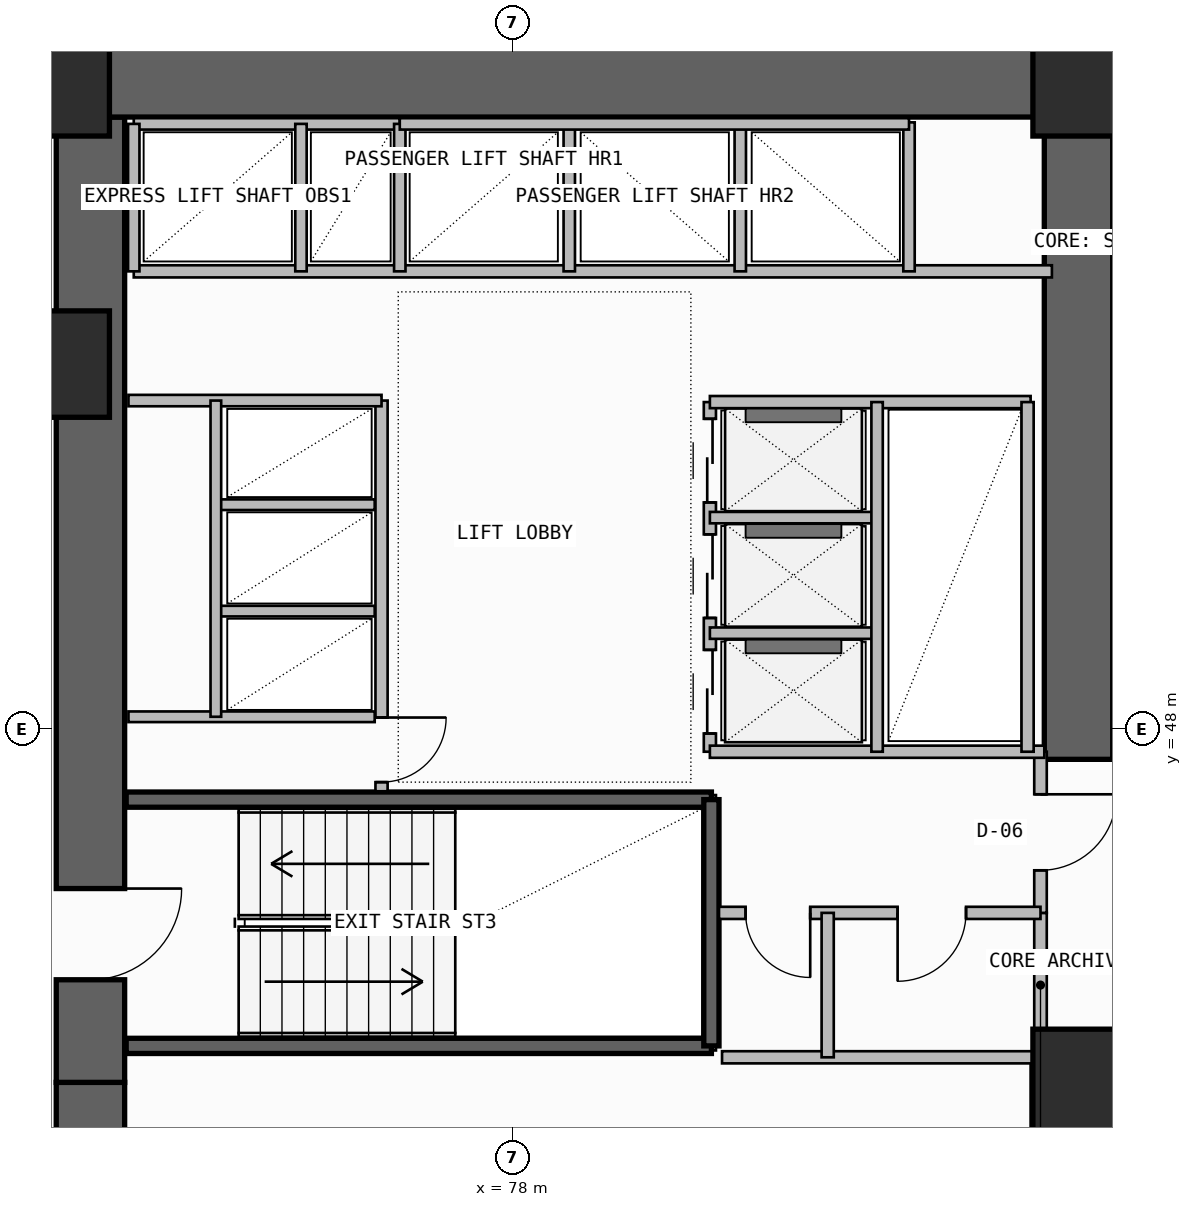
"""IFC4 building model, lengths in metres.
Left out: names, types, materials, properties, quantities, classifications, styles, units other than length and angle.
Written with IfcOpenShell. Run it as: python <this file> out.ifc"""

import sys

from ifc_helpers import new_model, si_unit, direction, frame, frame_2d, origin, origin_2d, place, context, subcontext, project, spatial, rectangle, extrude, element, fill, save


model = new_model("IFC4")
c1 = context("Model", 3, precision=1e-05, world=origin(), true_north=direction((0.0, 1.0)))
c2 = subcontext(c1, "Body", "Model", "MODEL_VIEW")
j1 = project(units=[si_unit("LENGTHUNIT", "METRE"), si_unit("PLANEANGLEUNIT", "RADIAN")], contexts=[c1])
p1 = place(None, origin())
s1 = spatial("IfcSite", under=j1, at=p1, CompositionType="ELEMENT")
p2 = place(p1, origin())
s2 = spatial("IfcBuilding", under=s1, at=p2, CompositionType="ELEMENT")
p3 = place(p2, frame((0.0, 0.0, 95.7)))
s3 = spatial("IfcBuildingStorey", under=s2, at=p3, CompositionType="ELEMENT", Elevation=95.7)
p4 = place(p3, frame((72.45, 35.5, -0.4), z_axis=(0.0, 0.0, 1.0), x_axis=(0.0, 1.0, 0.0)))
e1 = element("IfcWall", 1, at=p4, inside=s3, PredefinedType="SHEAR", context=c2, shape_type="SweptSolid", body=[
    extrude(rectangle(XDim=7.85, YDim=0.9, at=frame_2d((3.925, 0.0))), origin(), (0.0, 0.0, 1.0), 3.74),
])
p5 = place(p4, frame((1.45, 0.0, 0.4)))
e2 = element("IfcOpeningElement", 2, at=p5, cuts=e1, PredefinedType="OPENING", context=c2, shape_type="SweptSolid", body=[
    extrude(rectangle(XDim=1.2, YDim=2.2, at=frame_2d((0.6, 1.1))), frame((0.0, 0.46, 0.0), z_axis=(0.0, -1.0, 0.0), x_axis=(1.0, 0.0, 0.0)), (0.0, 0.0, 1.0), 0.92),
])
p6 = place(p3, frame((72.45, 43.35, -0.4), z_axis=(0.0, 0.0, 1.0), x_axis=(0.0, 1.0, 0.0)))
e3 = element("IfcWall", 3, at=p6, inside=s3, PredefinedType="SHEAR", context=c2, shape_type="SweptSolid", body=[
    extrude(rectangle(XDim=12.7, YDim=0.9, at=frame_2d((6.35, 0.0))), origin(), (0.0, 0.0, 1.0), 3.74),
])
p7 = place(p6, frame((1.35, 0.0, 0.4)))
e4 = element("IfcOpeningElement", 4, at=p7, cuts=e3, PredefinedType="OPENING", context=c2, shape_type="SweptSolid", body=[
    extrude(rectangle(XDim=1.2, YDim=2.2, at=frame_2d((0.6, 1.1))), frame((0.0, 0.46, 0.0), z_axis=(0.0, -1.0, 0.0), x_axis=(1.0, 0.0, 0.0)), (0.0, 0.0, 1.0), 0.92),
])
p8 = place(p3, frame((72.0, 56.5, -0.4), z_axis=(0.0, 0.0, 1.0), x_axis=(1.0, 0.0, 0.0)))
e5 = element("IfcWall", 5, at=p8, inside=s3, PredefinedType="SHEAR", context=c2, shape_type="SweptSolid", body=[
    extrude(rectangle(XDim=13.9, YDim=0.9, at=frame_2d((6.95, 0.0))), origin(), (0.0, 0.0, 1.0), 3.74),
])
p9 = place(p3, frame((85.45, 47.6, -0.4), z_axis=(0.0, 0.0, 1.0), x_axis=(0.0, 1.0, 0.0)))
e6 = element("IfcWall", 6, at=p9, inside=s3, PredefinedType="SHEAR", context=c2, shape_type="SweptSolid", body=[
    extrude(rectangle(XDim=8.45, YDim=0.9, at=frame_2d((4.225, 0.0))), origin(), (0.0, 0.0, 1.0), 3.74),
])
for number, where, z_axis, x_axis in (
    (7, (85.55, 43.35, 0.0), (0.0, 0.0, 1.0), (1.0, 0.0, 0.0)),
    (8, (72.0, 52.8, 0.0), (0.0, 0.0, 1.0), (1.0, 0.0, 0.0)),
    (9, (72.0, 56.5, 0.0), (0.0, 0.0, 1.0), (1.0, 0.0, 0.0)),
    (10, (85.55, 56.5, 0.0), (0.0, 0.0, 1.0), (1.0, 0.0, 0.0)),
):
    element("IfcColumn", number, at=place(p3, frame(where, z_axis=z_axis, x_axis=x_axis)), inside=s3, PredefinedType="COLUMN", context=c2, shape_type="SweptSolid", body=[
        extrude(rectangle(XDim=1.4, YDim=1.4, at=origin_2d()), origin(), (0.0, 0.0, 1.0), 3.6),
    ])
p10 = place(p3, frame((84.92, 38.85, 0.0), z_axis=(0.0, 0.0, 1.0), x_axis=(0.0, 1.0, 0.0)))
e11 = element("IfcWall", 11, at=p10, inside=s3, PredefinedType="SOLIDWALL", context=c2, shape_type="SweptSolid", body=[
    extrude(rectangle(XDim=4.83, YDim=0.2, at=frame_2d((2.415, 0.0))), origin(), (0.0, 0.0, 1.0), 3.34),
])
p11 = place(p10, frame((1.25, 0.0, 0.0)))
e12 = element("IfcOpeningElement", 12, at=p11, cuts=e11, PredefinedType="OPENING", context=c2, shape_type="SweptSolid", body=[
    extrude(rectangle(XDim=1.1, YDim=2.2, at=frame_2d((0.55, 1.1))), frame((0.0, 0.11, 0.0), z_axis=(0.0, -1.0, 0.0), x_axis=(1.0, 0.0, 0.0)), (0.0, 0.0, 1.0), 0.22),
])
for number, where, z_axis, x_axis in (
    (13, (72.92, 43.83, -0.4), (0.0, 0.0, 1.0), (1.0, 0.0, 0.0)),
    (14, (72.92, 47.07, -0.4), (0.0, 0.0, 1.0), (1.0, 0.0, 0.0)),
):
    element("IfcWall", number, at=place(p3, frame(where, z_axis=z_axis, x_axis=x_axis)), inside=s3, PredefinedType="SOLIDWALL", context=c2, shape_type="SweptSolid", body=[
        extrude(rectangle(XDim=7.7, YDim=0.2, at=frame_2d((3.85, 0.0))), origin(), (0.0, 0.0, 1.0), 3.74),
    ])
p12 = place(p3, frame((80.62, 43.83, -0.4), z_axis=(0.0, 0.0, 1.0), x_axis=(0.0, 1.0, 0.0)))
e15 = element("IfcWall", 15, at=p12, inside=s3, PredefinedType="SOLIDWALL", context=c2, shape_type="SweptSolid", body=[
    extrude(rectangle(XDim=3.24, YDim=0.2, at=frame_2d((1.62, 0.0))), origin(), (0.0, 0.0, 1.0), 3.74),
])
p13 = place(p3, frame((84.95, 43.68, 0.0), z_axis=(0.0, 0.0, 1.0), x_axis=(0.0, 1.0, 0.0)))
e16 = element("IfcWall", 16, at=p13, inside=s3, PredefinedType="PLUMBINGWALL", context=c2, shape_type="SweptSolid", body=[
    extrude(rectangle(XDim=1.9, YDim=0.165, at=frame_2d((0.95, 0.0))), origin(), (0.0, 0.0, 1.0), 3.34),
])
p14 = place(p3, frame((84.95, 45.58, 0.0), z_axis=(0.0, 0.0, 1.0), x_axis=(0.0, 1.0, 0.0)))
e17 = element("IfcWall", 17, at=p14, inside=s3, PredefinedType="PARTITIONING", context=c2, shape_type="SweptSolid", body=[
    extrude(rectangle(XDim=2.12, YDim=0.165, at=frame_2d((1.06, 0.0))), origin(), (0.0, 0.0, 1.0), 3.34),
])
p15 = place(p14, frame((0.56, 0.0, 0.0)))
e18 = element("IfcOpeningElement", 18, at=p15, cuts=e17, PredefinedType="OPENING", context=c2, shape_type="SweptSolid", body=[
    extrude(rectangle(XDim=1.0, YDim=2.2, at=frame_2d((0.5, 1.1))), frame((0.0, 0.093, 0.0), z_axis=(0.0, -1.0, 0.0), x_axis=(1.0, 0.0, 0.0)), (0.0, 0.0, 1.0), 0.185),
])
p16 = place(p3, frame((80.72, 45.58, 0.0), z_axis=(0.0, 0.0, 1.0), x_axis=(1.0, 0.0, 0.0)))
e19 = element("IfcWall", 19, at=p16, inside=s3, PredefinedType="PLUMBINGWALL", context=c2, shape_type="SweptSolid", body=[
    extrude(rectangle(XDim=4.23, YDim=0.16, at=frame_2d((2.115, 0.0))), origin(), (0.0, 0.0, 1.0), 3.34),
])
p17 = place(p16, frame((0.35, 0.0, 0.0)))
e20 = element("IfcOpeningElement", 20, at=p17, cuts=e19, PredefinedType="OPENING", context=c2, shape_type="SweptSolid", body=[
    extrude(rectangle(XDim=0.85, YDim=2.05, at=frame_2d((0.425, 1.025))), frame((0.0, 0.09, 0.0), z_axis=(0.0, -1.0, 0.0), x_axis=(1.0, 0.0, 0.0)), (0.0, 0.0, 1.0), 0.18),
])
p18 = place(p16, frame((2.35, 0.0, 0.0)))
e21 = element("IfcOpeningElement", 21, at=p18, cuts=e19, PredefinedType="OPENING", context=c2, shape_type="SweptSolid", body=[
    extrude(rectangle(XDim=0.9, YDim=2.1, at=frame_2d((0.45, 1.05))), frame((0.0, 0.09, 0.0), z_axis=(0.0, -1.0, 0.0), x_axis=(1.0, 0.0, 0.0)), (0.0, 0.0, 1.0), 0.18),
])
p19 = place(p3, frame((80.76, 43.68, 0.0), z_axis=(0.0, 0.0, 1.0), x_axis=(1.0, 0.0, 0.0)))
e22 = element("IfcWall", 22, at=p19, inside=s3, PredefinedType="PLUMBINGWALL", context=c2, shape_type="SweptSolid", body=[
    extrude(rectangle(XDim=4.19, YDim=0.16, at=frame_2d((2.095, 0.0))), origin(), (0.0, 0.0, 1.0), 3.34),
])
p20 = place(p3, frame((82.15, 43.68, 0.0), z_axis=(0.0, 0.0, 1.0), x_axis=(0.0, 1.0, 0.0)))
e23 = element("IfcWall", 23, at=p20, inside=s3, PredefinedType="PLUMBINGWALL", context=c2, shape_type="SweptSolid", body=[
    extrude(rectangle(XDim=1.9, YDim=0.16, at=frame_2d((0.95, 0.0))), origin(), (0.0, 0.0, 1.0), 3.34),
])
p21 = place(p3, frame((76.28, 47.18, 0.0), z_axis=(0.0, 0.0, 1.0), x_axis=(0.0, 1.0, 0.0)))
e24 = element("IfcWall", 24, at=p21, inside=s3, PredefinedType="SOLIDWALL", context=c2, shape_type="SweptSolid", body=[
    extrude(rectangle(XDim=5.14, YDim=0.16, at=frame_2d((2.57, 0.0))), origin(), (0.0, 0.0, 1.0), 3.34),
])
p22 = place(p21, frame((0.12, 0.0, 0.0)))
e25 = element("IfcOpeningElement", 25, at=p22, cuts=e24, PredefinedType="OPENING", context=c2, shape_type="SweptSolid", body=[
    extrude(rectangle(XDim=0.85, YDim=2.05, at=frame_2d((0.425, 1.025))), frame((0.0, 0.09, 0.0), z_axis=(0.0, -1.0, 0.0), x_axis=(1.0, 0.0, 0.0)), (0.0, 0.0, 1.0), 0.18),
])
p23 = place(p3, frame((72.95, 52.32, 0.0), z_axis=(0.0, 0.0, 1.0), x_axis=(1.0, 0.0, 0.0)))
e26 = element("IfcWall", 26, at=p23, inside=s3, PredefinedType="SOLIDWALL", context=c2, shape_type="SweptSolid", body=[
    extrude(rectangle(XDim=3.33, YDim=0.15, at=frame_2d((1.665, 0.0))), origin(), (0.0, 0.0, 1.0), 3.34),
])
p24 = place(p3, frame((72.95, 48.16, 0.0), z_axis=(0.0, 0.0, 1.0), x_axis=(1.0, 0.0, 0.0)))
e27 = element("IfcWall", 27, at=p24, inside=s3, PredefinedType="PLUMBINGWALL", context=c2, shape_type="SweptSolid", body=[
    extrude(rectangle(XDim=3.24, YDim=0.14, at=frame_2d((1.62, 0.0))), origin(), (0.0, 0.0, 1.0), 3.34),
])
for number, where, z_axis, x_axis in (
    (28, (74.15, 49.55, 0.0), (0.0, 0.0, 1.0), (1.0, 0.0, 0.0)),
    (29, (74.15, 50.95, 0.0), (0.0, 0.0, 1.0), (1.0, 0.0, 0.0)),
):
    element("IfcWall", number, at=place(p3, frame(where, z_axis=z_axis, x_axis=x_axis)), inside=s3, PredefinedType="PLUMBINGWALL", context=c2, shape_type="SweptSolid", body=[
        extrude(rectangle(XDim=2.04, YDim=0.14, at=frame_2d((1.02, 0.0))), origin(), (0.0, 0.0, 1.0), 3.34),
    ])
p25 = place(p3, frame((74.1, 48.16, 0.0), z_axis=(0.0, 0.0, 1.0), x_axis=(0.0, 1.0, 0.0)))
e30 = element("IfcWall", 30, at=p25, inside=s3, PredefinedType="PLUMBINGWALL", context=c2, shape_type="SweptSolid", body=[
    extrude(rectangle(XDim=4.16, YDim=0.14, at=frame_2d((2.08, 0.0))), origin(), (0.0, 0.0, 1.0), 3.34),
])
p26 = place(p3, frame((80.6, 47.7, 0.0), z_axis=(0.0, 0.0, 1.0), x_axis=(0.0, 1.0, 0.0)))
e31 = element("IfcWall", 31, at=p26, inside=s3, PredefinedType="SOLIDWALL", context=c2, shape_type="SweptSolid", body=[
    extrude(rectangle(XDim=4.6, YDim=0.16, at=frame_2d((2.3, 0.0))), origin(), (0.0, 0.0, 1.0), 3.34),
])
p27 = place(p26, frame((0.24, 0.0, 0.0)))
e32 = element("IfcOpeningElement", 32, at=p27, cuts=e31, PredefinedType="OPENING", context=c2, shape_type="SweptSolid", body=[
    extrude(rectangle(XDim=1.1, YDim=2.25, at=frame_2d((0.55, 1.125))), frame((0.0, 0.09, 0.0), z_axis=(0.0, -1.0, 0.0), x_axis=(1.0, 0.0, 0.0)), (0.0, 0.0, 1.0), 0.18),
])
p28 = place(p26, frame((1.76, 0.0, 0.0)))
e33 = element("IfcOpeningElement", 33, at=p28, cuts=e31, PredefinedType="OPENING", context=c2, shape_type="SweptSolid", body=[
    extrude(rectangle(XDim=1.1, YDim=2.25, at=frame_2d((0.55, 1.125))), frame((0.0, 0.09, 0.0), z_axis=(0.0, -1.0, 0.0), x_axis=(1.0, 0.0, 0.0)), (0.0, 0.0, 1.0), 0.18),
])
p29 = place(p26, frame((3.28, 0.0, 0.0)))
e34 = element("IfcOpeningElement", 34, at=p29, cuts=e31, PredefinedType="OPENING", context=c2, shape_type="SweptSolid", body=[
    extrude(rectangle(XDim=1.1, YDim=2.25, at=frame_2d((0.55, 1.125))), frame((0.0, 0.09, 0.0), z_axis=(0.0, -1.0, 0.0), x_axis=(1.0, 0.0, 0.0)), (0.0, 0.0, 1.0), 0.18),
])
p30 = place(p3, frame((80.6, 47.7, 0.0), z_axis=(0.0, 0.0, 1.0), x_axis=(1.0, 0.0, 0.0)))
e35 = element("IfcWall", 35, at=p30, inside=s3, PredefinedType="SOLIDWALL", context=c2, shape_type="SweptSolid", body=[
    extrude(rectangle(XDim=4.4, YDim=0.16, at=frame_2d((2.2, 0.0))), origin(), (0.0, 0.0, 1.0), 3.34),
])
p31 = place(p3, frame((80.6, 52.3, 0.0), z_axis=(0.0, 0.0, 1.0), x_axis=(1.0, 0.0, 0.0)))
e36 = element("IfcWall", 36, at=p31, inside=s3, PredefinedType="SOLIDWALL", context=c2, shape_type="SweptSolid", body=[
    extrude(rectangle(XDim=4.22, YDim=0.16, at=frame_2d((2.11, 0.0))), origin(), (0.0, 0.0, 1.0), 3.34),
])
for number, where, z_axis, x_axis in (
    (37, (80.6, 49.26, 0.0), (0.0, 0.0, 1.0), (1.0, 0.0, 0.0)),
    (38, (80.6, 50.78, 0.0), (0.0, 0.0, 1.0), (1.0, 0.0, 0.0)),
):
    element("IfcWall", number, at=place(p3, frame(where, z_axis=z_axis, x_axis=x_axis)), inside=s3, PredefinedType="PLUMBINGWALL", context=c2, shape_type="SweptSolid", body=[
        extrude(rectangle(XDim=2.2, YDim=0.15, at=frame_2d((1.1, 0.0))), origin(), (0.0, 0.0, 1.0), 3.34),
    ])
p32 = place(p3, frame((82.8, 47.7, 0.0), z_axis=(0.0, 0.0, 1.0), x_axis=(0.0, 1.0, 0.0)))
e39 = element("IfcWall", 39, at=p32, inside=s3, PredefinedType="PLUMBINGWALL", context=c2, shape_type="SweptSolid", body=[
    extrude(rectangle(XDim=4.6, YDim=0.15, at=frame_2d((2.3, 0.0))), origin(), (0.0, 0.0, 1.0), 3.34),
])
p33 = place(p3, frame((84.78, 47.7, 0.0), z_axis=(0.0, 0.0, 1.0), x_axis=(0.0, 1.0, 0.0)))
e40 = element("IfcWall", 40, at=p33, inside=s3, PredefinedType="SOLIDWALL", context=c2, shape_type="SweptSolid", body=[
    extrude(rectangle(XDim=4.6, YDim=0.16, at=frame_2d((2.3, 0.0))), origin(), (0.0, 0.0, 1.0), 3.34),
])
p34 = place(p3, frame((73.02, 54.02, 0.0), z_axis=(0.0, 0.0, 1.0), x_axis=(1.0, 0.0, 0.0)))
e41 = element("IfcWall", 41, at=p34, inside=s3, PredefinedType="SOLIDWALL", context=c2, shape_type="SweptSolid", body=[
    extrude(rectangle(XDim=12.08, YDim=0.16, at=frame_2d((6.04, 0.0))), origin(), (0.0, 0.0, 1.0), 3.34),
])
p35 = place(p3, frame((73.02, 55.96, 0.0), z_axis=(0.0, 0.0, 1.0), x_axis=(1.0, 0.0, 0.0)))
e42 = element("IfcWall", 42, at=p35, inside=s3, PredefinedType="SOLIDWALL", context=c2, shape_type="SweptSolid", body=[
    extrude(rectangle(XDim=3.5, YDim=0.15, at=frame_2d((1.75, 0.0))), origin(), (0.0, 0.0, 1.0), 3.34),
])
p36 = place(p3, frame((73.02, 54.02, 0.0), z_axis=(0.0, 0.0, 1.0), x_axis=(0.0, 1.0, 0.0)))
e43 = element("IfcWall", 43, at=p36, inside=s3, PredefinedType="PLUMBINGWALL", context=c2, shape_type="SweptSolid", body=[
    extrude(rectangle(XDim=1.94, YDim=0.15, at=frame_2d((0.97, 0.0))), origin(), (0.0, 0.0, 1.0), 3.34),
])
p37 = place(p3, frame((76.52, 54.02, 0.0), z_axis=(0.0, 0.0, 1.0), x_axis=(0.0, 1.0, 0.0)))
e44 = element("IfcWall", 44, at=p37, inside=s3, PredefinedType="SOLIDWALL", context=c2, shape_type="SweptSolid", body=[
    extrude(rectangle(XDim=1.94, YDim=0.15, at=frame_2d((0.97, 0.0))), origin(), (0.0, 0.0, 1.0), 3.34),
])
p38 = place(p3, frame((75.22, 54.02, 0.0), z_axis=(0.0, 0.0, 1.0), x_axis=(0.0, 1.0, 0.0)))
e45 = element("IfcWall", 45, at=p38, inside=s3, PredefinedType="PLUMBINGWALL", context=c2, shape_type="SweptSolid", body=[
    extrude(rectangle(XDim=1.94, YDim=0.15, at=frame_2d((0.97, 0.0))), origin(), (0.0, 0.0, 1.0), 3.34),
])
for number, where, z_axis, x_axis in (
    (46, (78.75, 54.02, 0.0), (0.0, 0.0, 1.0), (0.0, 1.0, 0.0)),
    (47, (81.0, 54.02, 0.0), (0.0, 0.0, 1.0), (0.0, 1.0, 0.0)),
):
    element("IfcWall", number, at=place(p3, frame(where, z_axis=z_axis, x_axis=x_axis)), inside=s3, PredefinedType="PLUMBINGWALL", context=c2, shape_type="SweptSolid", body=[
        extrude(rectangle(XDim=1.96, YDim=0.15, at=frame_2d((0.98, 0.0))), origin(), (0.0, 0.0, 1.0), 3.34),
    ])
p39 = place(p3, frame((83.22, 54.02, 0.0), z_axis=(0.0, 0.0, 1.0), x_axis=(0.0, 1.0, 0.0)))
e48 = element("IfcWall", 48, at=p39, inside=s3, PredefinedType="SOLIDWALL", context=c2, shape_type="SweptSolid", body=[
    extrude(rectangle(XDim=1.96, YDim=0.15, at=frame_2d((0.98, 0.0))), origin(), (0.0, 0.0, 1.0), 3.34),
])
p40 = place(p3, frame((76.52, 55.96, 0.0), z_axis=(0.0, 0.0, 1.0), x_axis=(1.0, 0.0, 0.0)))
e49 = element("IfcWall", 49, at=p40, inside=s3, PredefinedType="SOLIDWALL", context=c2, shape_type="SweptSolid", body=[
    extrude(rectangle(XDim=6.7, YDim=0.15, at=frame_2d((3.35, 0.0))), origin(), (0.0, 0.0, 1.0), 3.34),
])
p41 = place(p7, frame((1.2, 0.0, 0.0), z_axis=(0.0, 0.0, 1.0), x_axis=(-1.0, 0.0, 0.0)))
e50 = element("IfcDoor", 50, at=p41, inside=s3, OperationType="SINGLE_SWING_LEFT", PredefinedType="USERDEFINED", context=c2, shape_type="SweptSolid", body=[
    extrude(rectangle(XDim=1.2, YDim=2.2, at=frame_2d((0.6, 1.1))), frame((0.0, 0.025, 0.0), z_axis=(0.0, -1.0, 0.0), x_axis=(1.0, 0.0, 0.0)), (0.0, 0.0, 1.0), 0.05),
])
fill(e4, e50)
p42 = place(p15, frame((1.0, 0.0, 0.0), z_axis=(0.0, 0.0, 1.0), x_axis=(-1.0, 0.0, 0.0)))
e51 = element("IfcDoor", 51, at=p42, inside=s3, OperationType="SINGLE_SWING_LEFT", PredefinedType="DOOR", context=c2, shape_type="SweptSolid", body=[
    extrude(rectangle(XDim=1.0, YDim=2.2, at=frame_2d((0.5, 1.1))), frame((0.0, 0.025, 0.0), z_axis=(0.0, -1.0, 0.0), x_axis=(1.0, 0.0, 0.0)), (0.0, 0.0, 1.0), 0.05),
])
fill(e18, e51)
p43 = place(p17, frame((0.85, 0.0, 0.0), z_axis=(0.0, 0.0, 1.0), x_axis=(-1.0, 0.0, 0.0)))
e52 = element("IfcDoor", 52, at=p43, inside=s3, OperationType="SINGLE_SWING_LEFT", PredefinedType="DOOR", context=c2, shape_type="SweptSolid", body=[
    extrude(rectangle(XDim=0.85, YDim=2.05, at=frame_2d((0.425, 1.025))), frame((0.0, 0.025, 0.0), z_axis=(0.0, -1.0, 0.0), x_axis=(1.0, 0.0, 0.0)), (0.0, 0.0, 1.0), 0.05),
])
fill(e20, e52)
p44 = place(p18, frame((0.9, 0.0, 0.0), z_axis=(0.0, 0.0, 1.0), x_axis=(-1.0, 0.0, 0.0)))
e53 = element("IfcDoor", 53, at=p44, inside=s3, OperationType="SINGLE_SWING_RIGHT", PredefinedType="DOOR", context=c2, shape_type="SweptSolid", body=[
    extrude(rectangle(XDim=0.9, YDim=2.1, at=frame_2d((0.45, 1.05))), frame((0.0, 0.025, 0.0), z_axis=(0.0, -1.0, 0.0), x_axis=(1.0, 0.0, 0.0)), (0.0, 0.0, 1.0), 0.05),
])
fill(e21, e53)
p45 = place(p22, frame((0.85, 0.0, 0.0), z_axis=(0.0, 0.0, 1.0), x_axis=(-1.0, 0.0, 0.0)))
e54 = element("IfcDoor", 54, at=p45, inside=s3, OperationType="SINGLE_SWING_LEFT", PredefinedType="DOOR", context=c2, shape_type="SweptSolid", body=[
    extrude(rectangle(XDim=0.85, YDim=2.05, at=frame_2d((0.425, 1.025))), frame((0.0, 0.025, 0.0), z_axis=(0.0, -1.0, 0.0), x_axis=(1.0, 0.0, 0.0)), (0.0, 0.0, 1.0), 0.05),
])
fill(e25, e54)
p46 = place(p27, frame((1.1, 0.0, 0.0), z_axis=(0.0, 0.0, 1.0), x_axis=(-1.0, 0.0, 0.0)))
e55 = element("IfcDoor", 55, at=p46, inside=s3, OperationType="DOUBLE_DOOR_SLIDING", PredefinedType="DOOR", context=c2, shape_type="SweptSolid", body=[
    extrude(rectangle(XDim=1.1, YDim=2.25, at=frame_2d((0.55, 1.125))), frame((0.0, 0.025, 0.0), z_axis=(0.0, -1.0, 0.0), x_axis=(1.0, 0.0, 0.0)), (0.0, 0.0, 1.0), 0.05),
])
fill(e32, e55)
p47 = place(p28, frame((1.1, 0.0, 0.0), z_axis=(0.0, 0.0, 1.0), x_axis=(-1.0, 0.0, 0.0)))
e56 = element("IfcDoor", 56, at=p47, inside=s3, OperationType="DOUBLE_DOOR_SLIDING", PredefinedType="DOOR", context=c2, shape_type="SweptSolid", body=[
    extrude(rectangle(XDim=1.1, YDim=2.25, at=frame_2d((0.55, 1.125))), frame((0.0, 0.025, 0.0), z_axis=(0.0, -1.0, 0.0), x_axis=(1.0, 0.0, 0.0)), (0.0, 0.0, 1.0), 0.05),
])
fill(e33, e56)
p48 = place(p29, frame((1.1, 0.0, 0.0), z_axis=(0.0, 0.0, 1.0), x_axis=(-1.0, 0.0, 0.0)))
e57 = element("IfcDoor", 57, at=p48, inside=s3, OperationType="DOUBLE_DOOR_SLIDING", PredefinedType="DOOR", context=c2, shape_type="SweptSolid", body=[
    extrude(rectangle(XDim=1.1, YDim=2.25, at=frame_2d((0.55, 1.125))), frame((0.0, 0.025, 0.0), z_axis=(0.0, -1.0, 0.0), x_axis=(1.0, 0.0, 0.0)), (0.0, 0.0, 1.0), 0.05),
])
fill(e34, e57)
save(model, sys.argv[1])
